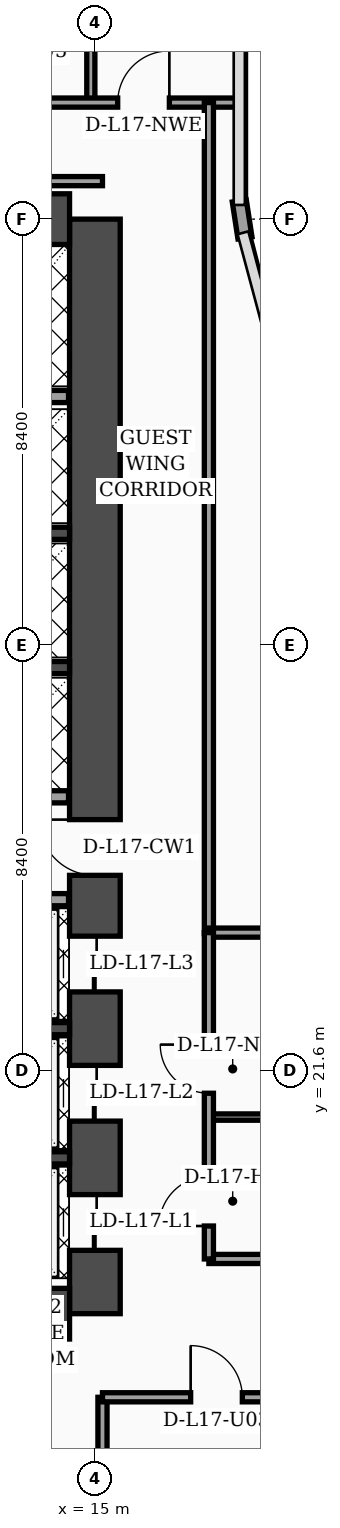
"""IFC4 building model, lengths in metres.
Left out: names, types, materials, properties, quantities, classifications, styles, units other than length and angle.
Written with IfcOpenShell. Run it as: python <this file> out.ifc"""

import sys

from ifc_helpers import new_model, si_unit, direction, frame, frame_2d, origin, place, context, subcontext, project, spatial, rectangle, extrude, element, fill, save


model = new_model("IFC4")
c1 = context("Model", 3, precision=1e-05, world=origin(), true_north=direction((0.0, 1.0)))
c2 = subcontext(c1, "Body", "Model", "MODEL_VIEW")
j1 = project(units=[si_unit("LENGTHUNIT", "METRE"), si_unit("PLANEANGLEUNIT", "RADIAN")], contexts=[c1])
p1 = place(None, origin())
s1 = spatial("IfcSite", under=j1, at=p1, CompositionType="ELEMENT")
p2 = place(p1, origin())
s2 = spatial("IfcBuilding", under=s1, at=p2, CompositionType="ELEMENT")
p3 = place(p2, frame((0.0, 0.0, 73.6)))
s3 = spatial("IfcBuildingStorey", under=s2, at=p3, CompositionType="ELEMENT", Elevation=73.6)
p4 = place(p3, frame((15.0, 16.8, 0.0), z_axis=(0.0, 0.0, 1.0), x_axis=(0.0, 1.0, 0.0)))
e1 = element("IfcWall", 1, at=p4, inside=s3, PredefinedType="SHEAR", context=c2, shape_type="SweptSolid", body=[
    extrude(rectangle(XDim=21.6, YDim=1.0, at=frame_2d((10.8, 0.0))), origin(), (0.0, 0.0, 1.0), 3.56),
])
p5 = place(p4, frame((8.65, 0.0, 0.0)))
e2 = element("IfcOpeningElement", 2, at=p5, cuts=e1, PredefinedType="OPENING", context=c2, shape_type="SweptSolid", body=[
    extrude(rectangle(XDim=1.1, YDim=2.2, at=frame_2d((0.55, 1.1))), frame((0.0, 0.51, 0.0), z_axis=(0.0, -1.0, 0.0), x_axis=(1.0, 0.0, 0.0)), (0.0, 0.0, 1.0), 1.02),
])
p6 = place(p4, frame((1.25, 0.0, 0.0)))
e3 = element("IfcOpeningElement", 3, at=p6, cuts=e1, PredefinedType="OPENING", context=c2, shape_type="SweptSolid", body=[
    extrude(rectangle(XDim=1.1, YDim=2.2, at=frame_2d((0.55, 1.1))), frame((0.0, 0.51, 0.0), z_axis=(0.0, -1.0, 0.0), x_axis=(1.0, 0.0, 0.0)), (0.0, 0.0, 1.0), 1.02),
])
p7 = place(p4, frame((3.8, 0.0, 0.0)))
e4 = element("IfcOpeningElement", 4, at=p7, cuts=e1, PredefinedType="OPENING", context=c2, shape_type="SweptSolid", body=[
    extrude(rectangle(XDim=1.1, YDim=2.2, at=frame_2d((0.55, 1.1))), frame((0.0, 0.51, 0.0), z_axis=(0.0, -1.0, 0.0), x_axis=(1.0, 0.0, 0.0)), (0.0, 0.0, 1.0), 1.02),
])
p8 = place(p4, frame((6.35, 0.0, 0.0)))
e5 = element("IfcOpeningElement", 5, at=p8, cuts=e1, PredefinedType="OPENING", context=c2, shape_type="SweptSolid", body=[
    extrude(rectangle(XDim=1.1, YDim=2.2, at=frame_2d((0.55, 1.1))), frame((0.0, 0.51, 0.0), z_axis=(0.0, -1.0, 0.0), x_axis=(1.0, 0.0, 0.0)), (0.0, 0.0, 1.0), 1.02),
])
for number, where, z_axis, x_axis in (
    (6, (4.7, 38.4, 0.0), (0.0, 0.0, 1.0), (1.0, 0.0, 0.0)),
    (7, (4.7, 16.8, 0.0), (0.0, 0.0, 1.0), (1.0, 0.0, 0.0)),
):
    element("IfcWall", number, at=place(p3, frame(where, z_axis=z_axis, x_axis=x_axis)), inside=s3, PredefinedType="SHEAR", context=c2, shape_type="SweptSolid", body=[
        extrude(rectangle(XDim=9.8, YDim=1.0, at=frame_2d((4.9, 0.0))), origin(), (0.0, 0.0, 1.0), 3.56),
    ])
for number, where, z_axis, x_axis in (
    (8, (12.18, 19.875, 0.0), (0.0, 0.0, 1.0), (1.0, 0.0, 0.0)),
    (9, (12.18, 22.425, 0.0), (0.0, 0.0, 1.0), (1.0, 0.0, 0.0)),
    (10, (12.18, 29.55, 0.0), (0.0, 0.0, 1.0), (1.0, 0.0, 0.0)),
    (11, (12.18, 32.2, 0.0), (0.0, 0.0, 1.0), (1.0, 0.0, 0.0)),
):
    element("IfcWall", number, at=place(p3, frame(where, z_axis=z_axis, x_axis=x_axis)), inside=s3, PredefinedType="SOLIDWALL", context=c2, shape_type="SweptSolid", body=[
        extrude(rectangle(XDim=2.32, YDim=0.24, at=frame_2d((1.16, 0.0))), origin(), (0.0, 0.0, 1.0), 3.56),
    ])
p9 = place(p3, frame((17.962, 38.03, 0.0), z_axis=(0.0, 0.0, 1.0), x_axis=(-0.15141125477, 0.988470855377, 0.0)))
e12 = element("IfcWall", 12, at=p9, inside=s3, PredefinedType="SOLIDWALL", context=c2, shape_type="SweptSolid", body=[
    extrude(rectangle(XDim=0.739, YDim=0.28, at=frame_2d((0.369, 0.0))), origin(), (0.0, 0.0, 1.0), 3.56),
])
p10 = place(p3, frame((12.15, 24.97, 0.0), z_axis=(0.0, 0.0, 1.0), x_axis=(1.0, 0.0, 0.0)))
e13 = element("IfcWall", 13, at=p10, inside=s3, PredefinedType="SOLIDWALL", context=c2, shape_type="SweptSolid", body=[
    extrude(rectangle(XDim=2.33, YDim=0.24, at=frame_2d((1.165, 0.0))), origin(), (0.0, 0.0, 1.0), 2.84),
])
p11 = place(p3, frame((12.25, 27.0, 0.0), z_axis=(0.0, 0.0, 1.0), x_axis=(1.0, 0.0, 0.0)))
e14 = element("IfcWall", 14, at=p11, inside=s3, PredefinedType="SOLIDWALL", context=c2, shape_type="SweptSolid", body=[
    extrude(rectangle(XDim=2.23, YDim=0.24, at=frame_2d((1.115, 0.0))), origin(), (0.0, 0.0, 1.0), 3.56),
])
p12 = place(p3, frame((9.66, 34.9, 0.0), z_axis=(0.0, 0.0, 1.0), x_axis=(1.0, 0.0, 0.0)))
e15 = element("IfcWall", 15, at=p12, inside=s3, PredefinedType="SOLIDWALL", context=c2, shape_type="SweptSolid", body=[
    extrude(rectangle(XDim=4.82, YDim=0.24, at=frame_2d((2.41, 0.0))), origin(), (0.0, 0.0, 1.0), 3.56),
])
p13 = place(p3, frame((15.15, 2.44, 0.0), z_axis=(0.0, 0.0, 1.0), x_axis=(0.0, 1.0, 0.0)))
e16 = element("IfcWall", 16, at=p13, inside=s3, PredefinedType="PARTITIONING", context=c2, shape_type="SweptSolid", body=[
    extrude(rectangle(XDim=12.71, YDim=0.18, at=frame_2d((6.355, 0.0))), origin(), (0.0, 0.0, 1.0), 3.04),
])
p14 = place(p3, frame((15.15, 15.15, 0.0), z_axis=(0.0, 0.0, 1.0), x_axis=(1.0, 0.0, 0.0)))
e17 = element("IfcWall", 17, at=p14, inside=s3, PredefinedType="PARTITIONING", context=c2, shape_type="SweptSolid", body=[
    extrude(rectangle(XDim=6.45, YDim=0.18, at=frame_2d((3.225, 0.0))), origin(), (0.0, 0.0, 1.0), 2.34),
])
p15 = place(p14, frame((1.74, 0.0, 0.0)))
e18 = element("IfcOpeningElement", 18, at=p15, cuts=e17, PredefinedType="OPENING", context=c2, shape_type="SweptSolid", body=[
    extrude(rectangle(XDim=1.02, YDim=2.2, at=frame_2d((0.51, 1.1))), frame((0.0, 0.1, 0.0), z_axis=(0.0, -1.0, 0.0), x_axis=(1.0, 0.0, 0.0)), (0.0, 0.0, 1.0), 0.2),
])
p16 = place(p3, frame((14.92, 40.7, 0.0), z_axis=(0.0, 0.0, 1.0), x_axis=(0.0, 1.0, 0.0)))
e19 = element("IfcWall", 19, at=p16, inside=s3, PredefinedType="PARTITIONING", context=c2, shape_type="SweptSolid", body=[
    extrude(rectangle(XDim=7.1, YDim=0.16, at=frame_2d((3.55, 0.0))), origin(), (0.0, 0.0, 1.0), 3.04),
])
p17 = place(p3, frame((0.08, 40.7, 0.0), z_axis=(0.0, 0.0, 1.0), x_axis=(1.0, 0.0, 0.0)))
e20 = element("IfcWall", 20, at=p17, inside=s3, PredefinedType="PARTITIONING", context=c2, shape_type="SweptSolid", body=[
    extrude(rectangle(XDim=17.77, YDim=0.18, at=frame_2d((8.885, 0.0))), origin(), (0.0, 0.0, 1.0), 2.84),
])
p18 = place(p17, frame((0.9, 0.0, 0.0)))
e21 = element("IfcOpeningElement", 21, at=p18, cuts=e20, PredefinedType="OPENING", context=c2, shape_type="SweptSolid", body=[
    extrude(rectangle(XDim=1.02, YDim=2.2, at=frame_2d((0.51, 1.1))), frame((0.0, 0.1, 0.0), z_axis=(0.0, -1.0, 0.0), x_axis=(1.0, 0.0, 0.0)), (0.0, 0.0, 1.0), 0.2),
])
p19 = place(p17, frame((4.04, 0.0, 0.0)))
e22 = element("IfcOpeningElement", 22, at=p19, cuts=e20, PredefinedType="OPENING", context=c2, shape_type="SweptSolid", body=[
    extrude(rectangle(XDim=1.02, YDim=2.2, at=frame_2d((0.51, 1.1))), frame((0.0, 0.1, 0.0), z_axis=(0.0, -1.0, 0.0), x_axis=(1.0, 0.0, 0.0)), (0.0, 0.0, 1.0), 0.2),
])
p20 = place(p17, frame((9.92, 0.0, 0.0)))
e23 = element("IfcOpeningElement", 23, at=p20, cuts=e20, PredefinedType="OPENING", context=c2, shape_type="SweptSolid", body=[
    extrude(rectangle(XDim=1.02, YDim=2.2, at=frame_2d((0.51, 1.1))), frame((0.0, 0.1, 0.0), z_axis=(0.0, -1.0, 0.0), x_axis=(1.0, 0.0, 0.0)), (0.0, 0.0, 1.0), 0.2),
])
p21 = place(p17, frame((15.37, 0.0, 0.0)))
e24 = element("IfcOpeningElement", 24, at=p21, cuts=e20, PredefinedType="OPENING", context=c2, shape_type="SweptSolid", body=[
    extrude(rectangle(XDim=1.02, YDim=2.2, at=frame_2d((0.51, 1.1))), frame((0.0, 0.1, 0.0), z_axis=(0.0, -1.0, 0.0), x_axis=(1.0, 0.0, 0.0)), (0.0, 0.0, 1.0), 0.2),
])
p22 = place(p3, frame((17.25, 24.3, 0.0), z_axis=(0.0, 0.0, 1.0), x_axis=(0.0, 1.0, 0.0)))
e25 = element("IfcWall", 25, at=p22, inside=s3, PredefinedType="PARTITIONING", context=c2, shape_type="SweptSolid", body=[
    extrude(rectangle(XDim=16.4, YDim=0.18, at=frame_2d((8.2, 0.0))), origin(), (0.0, 0.0, 1.0), 2.84),
])
p23 = place(p3, frame((3.68, 39.15, 0.0), z_axis=(0.0, 0.0, 1.0), x_axis=(1.0, 0.0, 0.0)))
e26 = element("IfcWall", 26, at=p23, inside=s3, PredefinedType="PARTITIONING", context=c2, shape_type="SweptSolid", body=[
    extrude(rectangle(XDim=11.47, YDim=0.18, at=frame_2d((5.735, 0.0))), origin(), (0.0, 0.0, 1.0), 2.84),
])
p24 = place(p3, frame((17.25, 17.88, 0.0), z_axis=(0.0, 0.0, 1.0), x_axis=(1.0, 0.0, 0.0)))
e27 = element("IfcWall", 27, at=p24, inside=s3, PredefinedType="PARTITIONING", context=c2, shape_type="SweptSolid", body=[
    extrude(rectangle(XDim=4.3, YDim=0.18, at=frame_2d((2.15, 0.0))), origin(), (0.0, 0.0, 1.0), 3.56),
])
p25 = place(p3, frame((17.25, 20.68, 0.0), z_axis=(0.0, 0.0, 1.0), x_axis=(1.0, 0.0, 0.0)))
e28 = element("IfcWall", 28, at=p25, inside=s3, PredefinedType="PARTITIONING", context=c2, shape_type="SweptSolid", body=[
    extrude(rectangle(XDim=4.3, YDim=0.125, at=frame_2d((2.15, 0.0))), origin(), (0.0, 0.0, 1.0), 3.56),
])
p26 = place(p3, frame((17.25, 24.32, 0.0), z_axis=(0.0, 0.0, 1.0), x_axis=(1.0, 0.0, 0.0)))
e29 = element("IfcWall", 29, at=p26, inside=s3, PredefinedType="PARTITIONING", context=c2, shape_type="SweptSolid", body=[
    extrude(rectangle(XDim=4.35, YDim=0.18, at=frame_2d((2.175, 0.0))), origin(), (0.0, 0.0, 1.0), 3.56),
])
p27 = place(p3, frame((17.25, 17.88, 0.0), z_axis=(0.0, 0.0, 1.0), x_axis=(0.0, 1.0, 0.0)))
e30 = element("IfcWall", 30, at=p27, inside=s3, PredefinedType="PARTITIONING", context=c2, shape_type="SweptSolid", body=[
    extrude(rectangle(XDim=6.44, YDim=0.18, at=frame_2d((3.22, 0.0))), origin(), (0.0, 0.0, 1.0), 3.56),
])
p28 = place(p27, frame((0.65, 0.0, 0.0)))
e31 = element("IfcOpeningElement", 31, at=p28, cuts=e30, PredefinedType="OPENING", context=c2, shape_type="SweptSolid", body=[
    extrude(rectangle(XDim=0.98, YDim=2.15, at=frame_2d((0.49, 1.075))), frame((0.0, 0.1, 0.0), z_axis=(0.0, -1.0, 0.0), x_axis=(1.0, 0.0, 0.0)), (0.0, 0.0, 1.0), 0.2),
])
p29 = place(p27, frame((3.27, 0.0, 0.0)))
e32 = element("IfcOpeningElement", 32, at=p29, cuts=e30, PredefinedType="OPENING", context=c2, shape_type="SweptSolid", body=[
    extrude(rectangle(XDim=0.96, YDim=2.2, at=frame_2d((0.48, 1.1))), frame((0.0, 0.1, 0.0), z_axis=(0.0, -1.0, 0.0), x_axis=(1.0, 0.0, 0.0)), (0.0, 0.0, 1.0), 0.2),
])
p30 = place(p15, origin())
e33 = element("IfcDoor", 33, at=p30, inside=s3, OperationType="SINGLE_SWING_LEFT", PredefinedType="DOOR", context=c2, shape_type="SweptSolid", body=[
    extrude(rectangle(XDim=1.02, YDim=2.2, at=frame_2d((0.51, 1.1))), frame((0.0, 0.025, 0.0), z_axis=(0.0, -1.0, 0.0), x_axis=(1.0, 0.0, 0.0)), (0.0, 0.0, 1.0), 0.05),
])
fill(e18, e33)
p31 = place(p21, origin())
e34 = element("IfcDoor", 34, at=p31, inside=s3, OperationType="SINGLE_SWING_RIGHT", PredefinedType="DOOR", context=c2, shape_type="SweptSolid", body=[
    extrude(rectangle(XDim=1.02, YDim=2.2, at=frame_2d((0.51, 1.1))), frame((0.0, 0.025, 0.0), z_axis=(0.0, -1.0, 0.0), x_axis=(1.0, 0.0, 0.0)), (0.0, 0.0, 1.0), 0.05),
])
fill(e24, e34)
p32 = place(p28, origin())
e35 = element("IfcDoor", 35, at=p32, inside=s3, OperationType="SINGLE_SWING_LEFT", PredefinedType="DOOR", context=c2, shape_type="SweptSolid", body=[
    extrude(rectangle(XDim=0.98, YDim=2.15, at=frame_2d((0.49, 1.075))), frame((0.0, 0.025, 0.0), z_axis=(0.0, -1.0, 0.0), x_axis=(1.0, 0.0, 0.0)), (0.0, 0.0, 1.0), 0.05),
])
fill(e31, e35)
p33 = place(p29, origin())
e36 = element("IfcDoor", 36, at=p33, inside=s3, OperationType="SINGLE_SWING_RIGHT", PredefinedType="DOOR", context=c2, shape_type="SweptSolid", body=[
    extrude(rectangle(XDim=0.96, YDim=2.2, at=frame_2d((0.48, 1.1))), frame((0.0, 0.025, 0.0), z_axis=(0.0, -1.0, 0.0), x_axis=(1.0, 0.0, 0.0)), (0.0, 0.0, 1.0), 0.05),
])
fill(e32, e36)
p34 = place(p5, origin())
e37 = element("IfcDoor", 37, at=p34, inside=s3, OperationType="SINGLE_SWING_RIGHT", PredefinedType="DOOR", context=c2, shape_type="SweptSolid", body=[
    extrude(rectangle(XDim=1.1, YDim=2.2, at=frame_2d((0.55, 1.1))), frame((0.0, 0.025, 0.0), z_axis=(0.0, -1.0, 0.0), x_axis=(1.0, 0.0, 0.0)), (0.0, 0.0, 1.0), 0.05),
])
fill(e2, e37)
p35 = place(p6, origin())
e38 = element("IfcDoor", 38, at=p35, inside=s3, OperationType="DOUBLE_DOOR_SLIDING", PredefinedType="DOOR", context=c2, shape_type="SweptSolid", body=[
    extrude(rectangle(XDim=1.1, YDim=2.2, at=frame_2d((0.55, 1.1))), frame((0.0, 0.025, 0.0), z_axis=(0.0, -1.0, 0.0), x_axis=(1.0, 0.0, 0.0)), (0.0, 0.0, 1.0), 0.05),
])
fill(e3, e38)
p36 = place(p7, origin())
e39 = element("IfcDoor", 39, at=p36, inside=s3, OperationType="DOUBLE_DOOR_SLIDING", PredefinedType="DOOR", context=c2, shape_type="SweptSolid", body=[
    extrude(rectangle(XDim=1.1, YDim=2.2, at=frame_2d((0.55, 1.1))), frame((0.0, 0.025, 0.0), z_axis=(0.0, -1.0, 0.0), x_axis=(1.0, 0.0, 0.0)), (0.0, 0.0, 1.0), 0.05),
])
fill(e4, e39)
p37 = place(p8, origin())
e40 = element("IfcDoor", 40, at=p37, inside=s3, OperationType="DOUBLE_DOOR_SLIDING", PredefinedType="DOOR", context=c2, shape_type="SweptSolid", body=[
    extrude(rectangle(XDim=1.1, YDim=2.2, at=frame_2d((0.55, 1.1))), frame((0.0, 0.025, 0.0), z_axis=(0.0, -1.0, 0.0), x_axis=(1.0, 0.0, 0.0)), (0.0, 0.0, 1.0), 0.05),
])
fill(e5, e40)
save(model, sys.argv[1])
